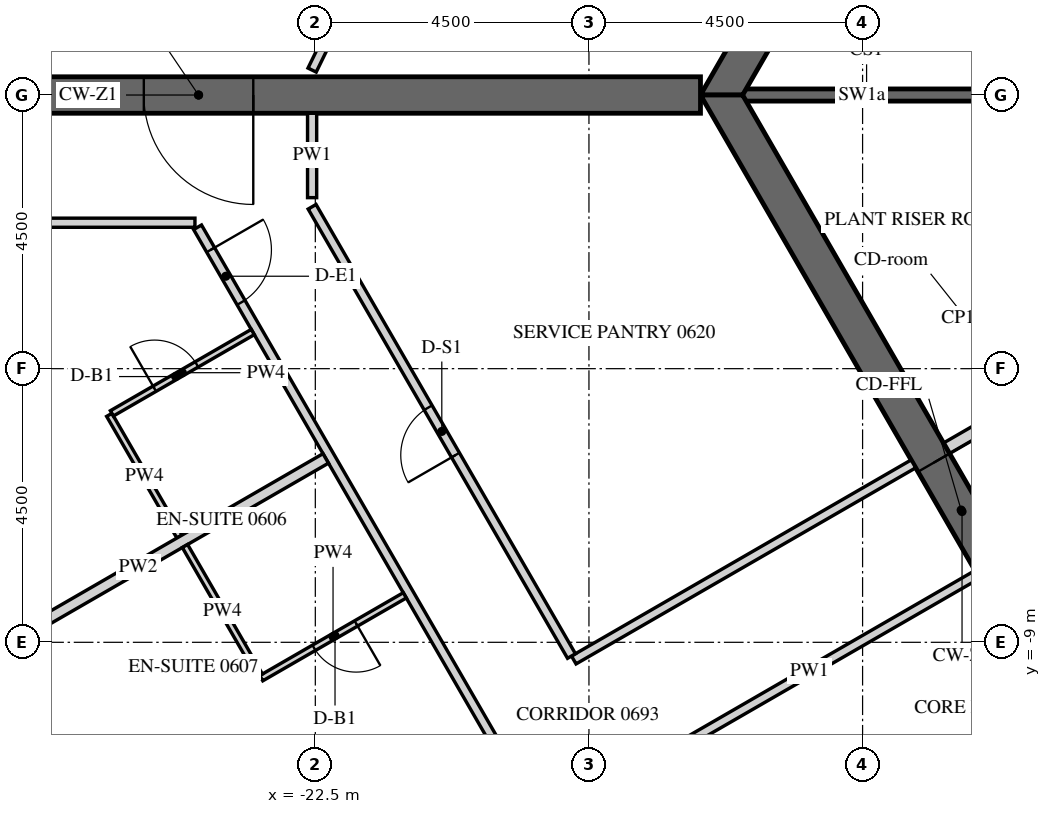
"""IFC4 building model, lengths in metres.
Left out: names, types, materials, properties, quantities, classifications, styles, units other than length and angle.
Written with IfcOpenShell. Run it as: python <this file> out.ifc"""

import sys

from ifc_helpers import new_model, si_unit, direction, frame, frame_2d, origin, place, context, subcontext, project, spatial, polyline, rectangle, outline, extrude, element, fill, save


model = new_model("IFC4")
c1 = context("Model", 3, precision=1e-05, world=origin(), true_north=direction((0.0, 1.0)))
c2 = subcontext(c1, "Body", "Model", "MODEL_VIEW")
j1 = project(units=[si_unit("LENGTHUNIT", "METRE"), si_unit("PLANEANGLEUNIT", "RADIAN")], contexts=[c1])
p1 = place(None, origin())
s1 = spatial("IfcSite", under=j1, at=p1, CompositionType="ELEMENT")
p2 = place(p1, origin())
s2 = spatial("IfcBuilding", under=s1, at=p2, CompositionType="ELEMENT")
p3 = place(p2, frame((0.0, 0.0, 92.1)))
s3 = spatial("IfcBuildingStorey", under=s2, at=p3, CompositionType="ELEMENT", Elevation=92.1)
p4 = place(p3, frame((-19.595, 27.633, -0.15), z_axis=(0.0, 0.0, 1.0), x_axis=(-0.438368285794, -0.898795441694, 0.0)))
e1 = element("IfcWall", 1, at=p4, inside=s3, PredefinedType="SOLIDWALL", context=c2, shape_type="SweptSolid", body=[
    extrude(outline(polyline([(-0.026, -0.275), (30.093, -0.275), (30.048, 0.275), (0.026, 0.275), (-0.026, -0.275)])), origin(), (0.0, 0.0, 1.0), 3.9),
])
p5 = place(p4, frame((1.236, 0.0, 1.05)))
e2 = element("IfcOpeningElement", 2, at=p5, cuts=e1, PredefinedType="OPENING", context=c2, shape_type="SweptSolid", body=[
    extrude(rectangle(XDim=2.4, YDim=2.4, at=frame_2d((1.2, 1.2))), frame((0.0, 0.285, 0.0), z_axis=(0.0, -1.0, 0.0), x_axis=(1.0, 0.0, 0.0)), (0.0, 0.0, 1.0), 0.57),
])
p6 = place(p4, frame((4.835, 0.0, 1.05)))
e3 = element("IfcOpeningElement", 3, at=p6, cuts=e1, PredefinedType="OPENING", context=c2, shape_type="SweptSolid", body=[
    extrude(rectangle(XDim=2.4, YDim=2.4, at=frame_2d((1.2, 1.2))), frame((0.0, 0.285, 0.0), z_axis=(0.0, -1.0, 0.0), x_axis=(1.0, 0.0, 0.0)), (0.0, 0.0, 1.0), 0.57),
])
p7 = place(p4, frame((8.436, 0.0, 1.05)))
e4 = element("IfcOpeningElement", 4, at=p7, cuts=e1, PredefinedType="OPENING", context=c2, shape_type="SweptSolid", body=[
    extrude(rectangle(XDim=2.4, YDim=2.4, at=frame_2d((1.2, 1.2))), frame((0.0, 0.285, 0.0), z_axis=(0.0, -1.0, 0.0), x_axis=(1.0, 0.0, 0.0)), (0.0, 0.0, 1.0), 0.57),
])
p8 = place(p4, frame((12.035, 0.0, 1.05)))
e5 = element("IfcOpeningElement", 5, at=p8, cuts=e1, PredefinedType="OPENING", context=c2, shape_type="SweptSolid", body=[
    extrude(rectangle(XDim=2.4, YDim=2.4, at=frame_2d((1.2, 1.2))), frame((0.0, 0.285, 0.0), z_axis=(0.0, -1.0, 0.0), x_axis=(1.0, 0.0, 0.0)), (0.0, 0.0, 1.0), 0.57),
])
p9 = place(p4, frame((15.635, 0.0, 1.05)))
e6 = element("IfcOpeningElement", 6, at=p9, cuts=e1, PredefinedType="OPENING", context=c2, shape_type="SweptSolid", body=[
    extrude(rectangle(XDim=2.4, YDim=2.4, at=frame_2d((1.2, 1.2))), frame((0.0, 0.285, 0.0), z_axis=(0.0, -1.0, 0.0), x_axis=(1.0, 0.0, 0.0)), (0.0, 0.0, 1.0), 0.57),
])
p10 = place(p4, frame((19.236, 0.0, 1.05)))
e7 = element("IfcOpeningElement", 7, at=p10, cuts=e1, PredefinedType="OPENING", context=c2, shape_type="SweptSolid", body=[
    extrude(rectangle(XDim=2.4, YDim=2.4, at=frame_2d((1.2, 1.2))), frame((0.0, 0.285, 0.0), z_axis=(0.0, -1.0, 0.0), x_axis=(1.0, 0.0, 0.0)), (0.0, 0.0, 1.0), 0.57),
])
p11 = place(p4, frame((22.835, 0.0, 1.05)))
e8 = element("IfcOpeningElement", 8, at=p11, cuts=e1, PredefinedType="OPENING", context=c2, shape_type="SweptSolid", body=[
    extrude(rectangle(XDim=2.4, YDim=2.4, at=frame_2d((1.2, 1.2))), frame((0.0, 0.285, 0.0), z_axis=(0.0, -1.0, 0.0), x_axis=(1.0, 0.0, 0.0)), (0.0, 0.0, 1.0), 0.57),
])
p12 = place(p4, frame((26.436, 0.0, 1.05)))
e9 = element("IfcOpeningElement", 9, at=p12, cuts=e1, PredefinedType="OPENING", context=c2, shape_type="SweptSolid", body=[
    extrude(rectangle(XDim=2.4, YDim=2.4, at=frame_2d((1.2, 1.2))), frame((0.0, 0.285, 0.0), z_axis=(0.0, -1.0, 0.0), x_axis=(1.0, 0.0, 0.0)), (0.0, 0.0, 1.0), 0.57),
])
p13 = place(p3, frame((-32.655, -2.89, -0.15), z_axis=(0.0, 0.0, 1.0), x_axis=(0.499997711317, -0.866026725152, 0.0)))
e10 = element("IfcWall", 10, at=p13, inside=s3, PredefinedType="SOLIDWALL", context=c2, shape_type="SweptSolid", body=[
    extrude(outline(polyline([(-0.022, -0.275), (30.097, -0.275), (30.045, 0.275), (0.022, 0.275), (-0.022, -0.275)])), origin(), (0.0, 0.0, 1.0), 3.9),
])
p14 = place(p13, frame((1.236, 0.0, 1.05)))
e11 = element("IfcOpeningElement", 11, at=p14, cuts=e10, PredefinedType="OPENING", context=c2, shape_type="SweptSolid", body=[
    extrude(rectangle(XDim=2.4, YDim=2.4, at=frame_2d((1.2, 1.2))), frame((0.0, 0.285, 0.0), z_axis=(0.0, -1.0, 0.0), x_axis=(1.0, 0.0, 0.0)), (0.0, 0.0, 1.0), 0.57),
])
p15 = place(p13, frame((4.835, 0.0, 1.05)))
e12 = element("IfcOpeningElement", 12, at=p15, cuts=e10, PredefinedType="OPENING", context=c2, shape_type="SweptSolid", body=[
    extrude(rectangle(XDim=2.4, YDim=2.4, at=frame_2d((1.2, 1.2))), frame((0.0, 0.285, 0.0), z_axis=(0.0, -1.0, 0.0), x_axis=(1.0, 0.0, 0.0)), (0.0, 0.0, 1.0), 0.57),
])
p16 = place(p13, frame((8.436, 0.0, 1.05)))
e13 = element("IfcOpeningElement", 13, at=p16, cuts=e10, PredefinedType="OPENING", context=c2, shape_type="SweptSolid", body=[
    extrude(rectangle(XDim=2.4, YDim=2.4, at=frame_2d((1.2, 1.2))), frame((0.0, 0.285, 0.0), z_axis=(0.0, -1.0, 0.0), x_axis=(1.0, 0.0, 0.0)), (0.0, 0.0, 1.0), 0.57),
])
p17 = place(p13, frame((12.035, 0.0, 1.05)))
e14 = element("IfcOpeningElement", 14, at=p17, cuts=e10, PredefinedType="OPENING", context=c2, shape_type="SweptSolid", body=[
    extrude(rectangle(XDim=2.4, YDim=2.4, at=frame_2d((1.2, 1.2))), frame((0.0, 0.285, 0.0), z_axis=(0.0, -1.0, 0.0), x_axis=(1.0, 0.0, 0.0)), (0.0, 0.0, 1.0), 0.57),
])
p18 = place(p13, frame((15.635, 0.0, 1.05)))
e15 = element("IfcOpeningElement", 15, at=p18, cuts=e10, PredefinedType="OPENING", context=c2, shape_type="SweptSolid", body=[
    extrude(rectangle(XDim=2.4, YDim=2.4, at=frame_2d((1.2, 1.2))), frame((0.0, 0.285, 0.0), z_axis=(0.0, -1.0, 0.0), x_axis=(1.0, 0.0, 0.0)), (0.0, 0.0, 1.0), 0.57),
])
p19 = place(p13, frame((19.236, 0.0, 1.05)))
e16 = element("IfcOpeningElement", 16, at=p19, cuts=e10, PredefinedType="OPENING", context=c2, shape_type="SweptSolid", body=[
    extrude(rectangle(XDim=2.4, YDim=2.4, at=frame_2d((1.2, 1.2))), frame((0.0, 0.285, 0.0), z_axis=(0.0, -1.0, 0.0), x_axis=(1.0, 0.0, 0.0)), (0.0, 0.0, 1.0), 0.57),
])
p20 = place(p13, frame((22.835, 0.0, 1.05)))
e17 = element("IfcOpeningElement", 17, at=p20, cuts=e10, PredefinedType="OPENING", context=c2, shape_type="SweptSolid", body=[
    extrude(rectangle(XDim=2.4, YDim=2.4, at=frame_2d((1.2, 1.2))), frame((0.0, 0.285, 0.0), z_axis=(0.0, -1.0, 0.0), x_axis=(1.0, 0.0, 0.0)), (0.0, 0.0, 1.0), 0.57),
])
p21 = place(p13, frame((26.436, 0.0, 1.05)))
e18 = element("IfcOpeningElement", 18, at=p21, cuts=e10, PredefinedType="OPENING", context=c2, shape_type="SweptSolid", body=[
    extrude(rectangle(XDim=2.4, YDim=2.4, at=frame_2d((1.2, 1.2))), frame((0.0, 0.285, 0.0), z_axis=(0.0, -1.0, 0.0), x_axis=(1.0, 0.0, 0.0)), (0.0, 0.0, 1.0), 0.57),
])
p22 = place(p3, frame((-7.91, 13.7, -0.15), z_axis=(0.0, 0.0, 1.0), x_axis=(-0.499999880136, -0.866025472988, 0.0)))
e19 = element("IfcWall", 19, at=p22, inside=s3, PredefinedType="SHEAR", context=c2, shape_type="SweptSolid", body=[
    extrude(outline(polyline([(-0.173, -0.3), (15.993, -0.3), (15.646, 0.3), (0.173, 0.3), (-0.173, -0.3)])), origin(), (0.0, 0.0, 1.0), 3.9),
])
p23 = place(p22, frame((7.039, 0.0, 0.15)))
e20 = element("IfcOpeningElement", 20, at=p23, cuts=e19, PredefinedType="OPENING", context=c2, shape_type="SweptSolid", body=[
    extrude(rectangle(XDim=1.8, YDim=2.4, at=frame_2d((0.9, 1.2))), frame((0.0, 0.31, 0.0), z_axis=(0.0, -1.0, 0.0), x_axis=(1.0, 0.0, 0.0)), (0.0, 0.0, 1.0), 0.62),
])
p24 = place(p3, frame((-15.819, 0.0, -0.15), z_axis=(0.0, 0.0, 1.0), x_axis=(0.499999880136, -0.866025472988, 0.0)))
e21 = element("IfcWall", 21, at=p24, inside=s3, PredefinedType="SHEAR", context=c2, shape_type="SweptSolid", body=[
    extrude(outline(polyline([(-0.173, -0.3), (15.993, -0.3), (15.646, 0.3), (0.173, 0.3), (-0.173, -0.3)])), origin(), (0.0, 0.0, 1.0), 3.9),
])
p25 = place(p24, frame((6.981, 0.0, 0.15)))
e22 = element("IfcOpeningElement", 22, at=p25, cuts=e21, PredefinedType="OPENING", context=c2, shape_type="SweptSolid", body=[
    extrude(rectangle(XDim=1.8, YDim=2.4, at=frame_2d((0.9, 1.2))), frame((0.0, 0.31, 0.0), z_axis=(0.0, -1.0, 0.0), x_axis=(1.0, 0.0, 0.0)), (0.0, 0.0, 1.0), 0.62),
])
p26 = place(p3, frame((-16.166, 0.0, -0.15), z_axis=(0.0, 0.0, 1.0), x_axis=(-1.0, 0.0, 0.0)))
e23 = element("IfcWall", 23, at=p26, inside=s3, PredefinedType="SHEAR", context=c2, shape_type="SweptSolid", body=[
    extrude(rectangle(XDim=16.509, YDim=0.6, at=frame_2d((8.254, 0.0))), origin(), (0.0, 0.0, 1.0), 3.9),
])
p27 = place(p26, frame((7.354, 0.0, 0.15)))
e24 = element("IfcOpeningElement", 24, at=p27, cuts=e23, PredefinedType="OPENING", context=c2, shape_type="SweptSolid", body=[
    extrude(rectangle(XDim=1.8, YDim=2.4, at=frame_2d((0.9, 1.2))), frame((0.0, 0.31, 0.0), z_axis=(0.0, -1.0, 0.0), x_axis=(1.0, 0.0, 0.0)), (0.0, 0.0, 1.0), 0.62),
])
p28 = place(p3, frame((-11.547, 0.0, -0.15), z_axis=(0.0, 0.0, 1.0), x_axis=(-1.0, 0.0, 0.0)))
e25 = element("IfcWall", 25, at=p28, inside=s3, PredefinedType="SHEAR", context=c2, shape_type="SweptSolid", body=[
    extrude(rectangle(XDim=3.926, YDim=0.2, at=frame_2d((1.963, 0.0))), origin(), (0.0, 0.0, 1.0), 3.9),
])
p29 = place(p3, frame((-9.175, -4.109, 0.0), z_axis=(0.0, 0.0, 1.0), x_axis=(-0.865989465428, -0.500062241894, 0.0)))
e26 = element("IfcWall", 26, at=p29, inside=s3, PredefinedType="PARTITIONING", context=c2, shape_type="SweptSolid", body=[
    extrude(rectangle(XDim=3.4, YDim=0.2, at=frame_2d((1.7, 0.0))), origin(), (0.0, 0.0, 1.0), 3.65),
])
p30 = place(p29, frame((1.351, 0.0, 0.0)))
e27 = element("IfcOpeningElement", 27, at=p30, cuts=e26, PredefinedType="OPENING", context=c2, shape_type="SweptSolid", body=[
    extrude(rectangle(XDim=0.9, YDim=2.1, at=frame_2d((0.45, 1.05))), frame((0.0, 0.11, 0.0), z_axis=(0.0, -1.0, 0.0), x_axis=(1.0, 0.0, 0.0)), (0.0, 0.0, 1.0), 0.22),
])
p31 = place(p3, frame((-22.553, 0.41, 0.0), z_axis=(0.0, 0.0, 1.0), x_axis=(0.438382679221, 0.898788421465, 0.0)))
e28 = element("IfcWall", 28, at=p31, inside=s3, PredefinedType="PARTITIONING", context=c2, shape_type="SweptSolid", body=[
    extrude(rectangle(XDim=9.866, YDim=0.15, at=frame_2d((4.933, 0.0))), origin(), (0.0, 0.0, 1.0), 2.988),
])
p32 = place(p31, frame((4.483, 0.0, 0.0)))
e29 = element("IfcOpeningElement", 29, at=p32, cuts=e28, PredefinedType="OPENING", context=c2, shape_type="SweptSolid", body=[
    extrude(rectangle(XDim=0.9, YDim=2.1, at=frame_2d((0.45, 1.05))), frame((0.0, 0.085, 0.0), z_axis=(0.0, -1.0, 0.0), x_axis=(1.0, 0.0, 0.0)), (0.0, 0.0, 1.0), 0.17),
])
p33 = place(p3, frame((-27.245, -2.1, 0.0), z_axis=(0.0, 0.0, 1.0), x_axis=(1.0, 0.0, 0.0)))
e30 = element("IfcWall", 30, at=p33, inside=s3, PredefinedType="PARTITIONING", context=c2, shape_type="SweptSolid", body=[
    extrude(rectangle(XDim=2.766, YDim=0.15, at=frame_2d((1.383, 0.0))), origin(), (0.0, 0.0, 1.0), 2.988),
])
p34 = place(p3, frame((-24.436, -2.175, 0.0), z_axis=(0.0, 0.0, 1.0), x_axis=(0.499996816197, -0.866027241946, 0.0)))
e31 = element("IfcWall", 31, at=p34, inside=s3, PredefinedType="PARTITIONING", context=c2, shape_type="SweptSolid", body=[
    extrude(rectangle(XDim=24.238, YDim=0.15, at=frame_2d((12.119, 0.0))), origin(), (0.0, 0.0, 1.0), 2.988),
])
p35 = place(p34, frame((0.429, 0.0, 0.0)))
e32 = element("IfcOpeningElement", 32, at=p35, cuts=e31, PredefinedType="OPENING", context=c2, shape_type="SweptSolid", body=[
    extrude(rectangle(XDim=1.0, YDim=2.1, at=frame_2d((0.5, 1.05))), frame((0.0, 0.085, 0.0), z_axis=(0.0, -1.0, 0.0), x_axis=(1.0, 0.0, 0.0)), (0.0, 0.0, 1.0), 0.17),
])
p36 = place(p34, frame((12.346, 0.0, 0.0)))
e33 = element("IfcOpeningElement", 33, at=p36, cuts=e31, PredefinedType="OPENING", context=c2, shape_type="SweptSolid", body=[
    extrude(rectangle(XDim=1.0, YDim=2.1, at=frame_2d((0.5, 1.05))), frame((0.0, 0.085, 0.0), z_axis=(0.0, -1.0, 0.0), x_axis=(1.0, 0.0, 0.0)), (0.0, 0.0, 1.0), 0.17),
])
p37 = place(p34, frame((22.292, 0.0, 0.0)))
e34 = element("IfcOpeningElement", 34, at=p37, cuts=e31, PredefinedType="OPENING", context=c2, shape_type="SweptSolid", body=[
    extrude(rectangle(XDim=1.0, YDim=2.1, at=frame_2d((0.5, 1.05))), frame((0.0, 0.085, 0.0), z_axis=(0.0, -1.0, 0.0), x_axis=(1.0, 0.0, 0.0)), (0.0, 0.0, 1.0), 0.17),
])
p38 = place(p3, frame((-12.664, -6.066, 0.0), z_axis=(0.0, 0.0, 1.0), x_axis=(-0.866021702275, -0.500006411147, 0.0)))
e35 = element("IfcWall", 35, at=p38, inside=s3, PredefinedType="PARTITIONING", context=c2, shape_type="SweptSolid", body=[
    extrude(rectangle(XDim=6.45, YDim=0.15, at=frame_2d((3.225, 0.0))), origin(), (0.0, 0.0, 1.0), 2.988),
])
p39 = place(p3, frame((-18.287, -9.226, 0.0), z_axis=(0.0, 0.0, 1.0), x_axis=(-0.500004853958, 0.866022601332, 0.0)))
e36 = element("IfcWall", 36, at=p39, inside=s3, PredefinedType="PARTITIONING", context=c2, shape_type="SweptSolid", body=[
    extrude(rectangle(XDim=8.531, YDim=0.15, at=frame_2d((4.266, 0.0))), origin(), (0.0, 0.0, 1.0), 2.988),
])
p40 = place(p39, frame((3.816, 0.0, 0.0)))
e37 = element("IfcOpeningElement", 37, at=p40, cuts=e36, PredefinedType="OPENING", context=c2, shape_type="SweptSolid", body=[
    extrude(rectangle(XDim=0.9, YDim=2.1, at=frame_2d((0.45, 1.05))), frame((0.0, 0.085, 0.0), z_axis=(0.0, -1.0, 0.0), x_axis=(1.0, 0.0, 0.0)), (0.0, 0.0, 1.0), 0.17),
])
p41 = place(p3, frame((-22.553, -1.688, 0.0), z_axis=(0.0, 0.0, 1.0), x_axis=(0.0, 1.0, 0.0)))
e38 = element("IfcWall", 38, at=p41, inside=s3, PredefinedType="PARTITIONING", context=c2, shape_type="SweptSolid", body=[
    extrude(rectangle(XDim=1.387, YDim=0.15, at=frame_2d((0.694, 0.0))), origin(), (0.0, 0.0, 1.0), 2.988),
])
p42 = place(p3, frame((-17.135, -11.072, 0.0), z_axis=(0.0, 0.0, 1.0), x_axis=(0.866028703517, 0.499994284652, 0.0)))
e39 = element("IfcWall", 39, at=p42, inside=s3, PredefinedType="PARTITIONING", context=c2, shape_type="SweptSolid", body=[
    extrude(rectangle(XDim=6.375, YDim=0.15, at=frame_2d((3.188, 0.0))), origin(), (0.0, 0.0, 1.0), 2.988),
])
p43 = place(p3, frame((-24.733, -7.26, 0.0), z_axis=(0.0, 0.0, 1.0), x_axis=(-0.500015210774, 0.866016621662, 0.0)))
e40 = element("IfcWall", 40, at=p43, inside=s3, PredefinedType="PARTITIONING", context=c2, shape_type="SweptSolid", body=[
    extrude(rectangle(XDim=2.31, YDim=0.1, at=frame_2d((1.155, 0.0))), origin(), (0.0, 0.0, 1.0), 2.988),
])
p44 = place(p3, frame((-25.845, -5.235, 0.0), z_axis=(0.0, 0.0, 1.0), x_axis=(0.86604424267, 0.499967368674, 0.0)))
e41 = element("IfcWall", 41, at=p44, inside=s3, PredefinedType="PARTITIONING", context=c2, shape_type="SweptSolid", body=[
    extrude(rectangle(XDim=2.675, YDim=0.1, at=frame_2d((1.337, 0.0))), origin(), (0.0, 0.0, 1.0), 2.988),
])
p45 = place(p44, frame((0.81, 0.0, 0.0)))
e42 = element("IfcOpeningElement", 42, at=p45, cuts=e41, PredefinedType="OPENING", context=c2, shape_type="SweptSolid", body=[
    extrude(rectangle(XDim=0.8, YDim=2.1, at=frame_2d((0.4, 1.05))), frame((0.0, 0.06, 0.0), z_axis=(0.0, -1.0, 0.0), x_axis=(1.0, 0.0, 0.0)), (0.0, 0.0, 1.0), 0.12),
])
p46 = place(p3, frame((-28.499, -9.538, 0.0), z_axis=(0.0, 0.0, 1.0), x_axis=(0.866024672353, 0.500001266874, 0.0)))
e43 = element("IfcWall", 43, at=p46, inside=s3, PredefinedType="PARTITIONING", context=c2, shape_type="SweptSolid", body=[
    extrude(rectangle(XDim=7.125, YDim=0.18, at=frame_2d((3.562, 0.0))), origin(), (0.0, 0.0, 1.0), 2.988),
])
p47 = place(p3, frame((-21.029, -8.228, 0.0), z_axis=(0.0, 0.0, 1.0), x_axis=(-0.866012511928, -0.500022328685, 0.0)))
e44 = element("IfcWall", 44, at=p47, inside=s3, PredefinedType="PARTITIONING", context=c2, shape_type="SweptSolid", body=[
    extrude(rectangle(XDim=2.725, YDim=0.1, at=frame_2d((1.363, 0.0))), origin(), (0.0, 0.0, 1.0), 2.988),
])
p48 = place(p47, frame((0.925, 0.0, 0.0)))
e45 = element("IfcOpeningElement", 45, at=p48, cuts=e44, PredefinedType="OPENING", context=c2, shape_type="SweptSolid", body=[
    extrude(rectangle(XDim=0.8, YDim=2.1, at=frame_2d((0.4, 1.05))), frame((0.0, 0.06, 0.0), z_axis=(0.0, -1.0, 0.0), x_axis=(1.0, 0.0, 0.0)), (0.0, 0.0, 1.0), 0.12),
])
p49 = place(p3, frame((-23.413, -9.547, 0.0), z_axis=(0.0, 0.0, 1.0), x_axis=(-0.499960120811, 0.86604842682, 0.0)))
e46 = element("IfcWall", 46, at=p49, inside=s3, PredefinedType="PARTITIONING", context=c2, shape_type="SweptSolid", body=[
    extrude(rectangle(XDim=2.46, YDim=0.1, at=frame_2d((1.23, 0.0))), origin(), (0.0, 0.0, 1.0), 2.988),
])
p50 = place(p25, origin())
e47 = element("IfcDoor", 47, at=p50, inside=s3, OperationType="DOUBLE_DOOR_SINGLE_SWING", PredefinedType="DOOR", context=c2, shape_type="SweptSolid", body=[
    extrude(rectangle(XDim=1.8, YDim=2.4, at=frame_2d((0.9, 1.2))), frame((0.0, 0.025, 0.0), z_axis=(0.0, -1.0, 0.0), x_axis=(1.0, 0.0, 0.0)), (0.0, 0.0, 1.0), 0.05),
])
fill(e22, e47)
p51 = place(p27, origin())
e48 = element("IfcDoor", 48, at=p51, inside=s3, OperationType="DOUBLE_DOOR_SINGLE_SWING", PredefinedType="DOOR", context=c2, shape_type="SweptSolid", body=[
    extrude(rectangle(XDim=1.8, YDim=2.4, at=frame_2d((0.9, 1.2))), frame((0.0, 0.025, 0.0), z_axis=(0.0, -1.0, 0.0), x_axis=(1.0, 0.0, 0.0)), (0.0, 0.0, 1.0), 0.05),
])
fill(e24, e48)
p52 = place(p35, origin())
e49 = element("IfcDoor", 49, at=p52, inside=s3, OperationType="SINGLE_SWING_RIGHT", PredefinedType="DOOR", context=c2, shape_type="SweptSolid", body=[
    extrude(rectangle(XDim=1.0, YDim=2.1, at=frame_2d((0.5, 1.05))), frame((0.0, 0.025, 0.0), z_axis=(0.0, -1.0, 0.0), x_axis=(1.0, 0.0, 0.0)), (0.0, 0.0, 1.0), 0.05),
])
fill(e32, e49)
p53 = place(p45, origin())
e50 = element("IfcDoor", 50, at=p53, inside=s3, OperationType="SINGLE_SWING_RIGHT", PredefinedType="DOOR", context=c2, shape_type="SweptSolid", body=[
    extrude(rectangle(XDim=0.8, YDim=2.1, at=frame_2d((0.4, 1.05))), frame((0.0, 0.025, 0.0), z_axis=(0.0, -1.0, 0.0), x_axis=(1.0, 0.0, 0.0)), (0.0, 0.0, 1.0), 0.05),
])
fill(e42, e50)
p54 = place(p48, origin())
e51 = element("IfcDoor", 51, at=p54, inside=s3, OperationType="SINGLE_SWING_RIGHT", PredefinedType="DOOR", context=c2, shape_type="SweptSolid", body=[
    extrude(rectangle(XDim=0.8, YDim=2.1, at=frame_2d((0.4, 1.05))), frame((0.0, 0.025, 0.0), z_axis=(0.0, -1.0, 0.0), x_axis=(1.0, 0.0, 0.0)), (0.0, 0.0, 1.0), 0.05),
])
fill(e45, e51)
p55 = place(p40, origin())
e52 = element("IfcDoor", 52, at=p55, inside=s3, OperationType="SINGLE_SWING_RIGHT", PredefinedType="DOOR", context=c2, shape_type="SweptSolid", body=[
    extrude(rectangle(XDim=0.9, YDim=2.1, at=frame_2d((0.45, 1.05))), frame((0.0, 0.025, 0.0), z_axis=(0.0, -1.0, 0.0), x_axis=(1.0, 0.0, 0.0)), (0.0, 0.0, 1.0), 0.05),
])
fill(e37, e52)
save(model, sys.argv[1])
